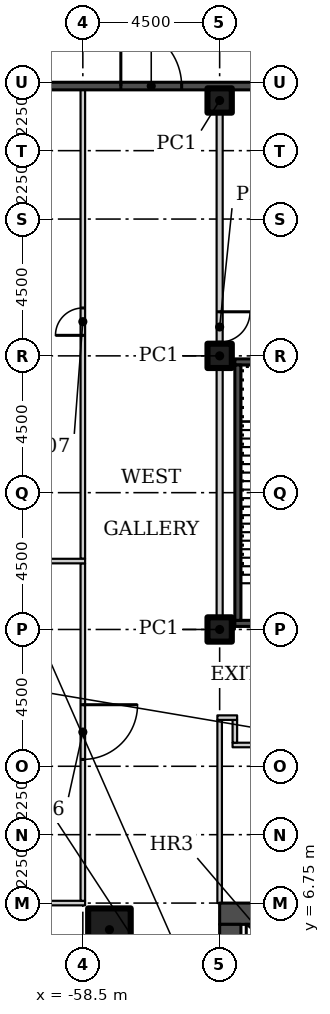
"""IFC4 building model, lengths in metres.
Left out: names, types, materials, properties, quantities, classifications, styles, units other than length and angle.
Written with IfcOpenShell. Run it as: python <this file> out.ifc"""

import sys

from ifc_helpers import new_model, si_unit, direction, frame, frame_2d, origin, origin_2d, place, context, subcontext, project, spatial, rectangle, hollow_rectangle, extrude, element, fill, save


model = new_model("IFC4")
c1 = context("Model", 3, precision=1e-05, world=origin(), true_north=direction((0.0, 1.0)))
c2 = subcontext(c1, "Body", "Model", "MODEL_VIEW")
j1 = project(units=[si_unit("LENGTHUNIT", "METRE"), si_unit("PLANEANGLEUNIT", "RADIAN")], contexts=[c1])
p1 = place(None, origin())
s1 = spatial("IfcSite", under=j1, at=p1, CompositionType="ELEMENT")
p2 = place(p1, origin())
s2 = spatial("IfcBuilding", under=s1, at=p2, CompositionType="ELEMENT")
p3 = place(p2, origin())
s3 = spatial("IfcBuildingStorey", under=s2, at=p3, CompositionType="ELEMENT", Elevation=0.0)
p4 = place(p3, frame((-57.625, 5.875, 0.0)))
e1 = element("IfcColumn", 1, at=p4, inside=s3, PredefinedType="COLUMN", context=c2, shape_type="SweptSolid", body=[
    extrude(hollow_rectangle(XDim=1.4, YDim=1.4, WallThickness=0.06, at=origin_2d()), origin(), (0.0, 0.0, 1.0), 6.1),
])
for number, where in (
    (2, (-54.0, 15.75, 0.0)),
    (3, (-54.0, 24.75, 0.0)),
    (4, (-54.0, 33.15, 0.0)),
):
    element("IfcColumn", number, at=place(p3, frame(where)), inside=s3, PredefinedType="COLUMN", context=c2, shape_type="SweptSolid", body=[
        extrude(hollow_rectangle(XDim=0.8, YDim=0.8, WallThickness=0.03, at=origin_2d()), origin(), (0.0, 0.0, 1.0), 6.1),
    ])
p5 = place(p3, frame((-53.575, 11.95, 0.0)))
e5 = element("IfcWall", 5, at=p5, inside=s3, PredefinedType="PARTITIONING", context=c2, shape_type="SweptSolid", body=[
    extrude(rectangle(XDim=9.175, YDim=0.15, at=frame_2d((4.587, 0.0))), origin(), (0.0, 0.0, 1.0), 6.1),
])
p6 = place(p5, frame((3.175, 0.0, 0.0)))
e6 = element("IfcOpeningElement", 6, at=p6, cuts=e5, PredefinedType="OPENING", context=c2, shape_type="SweptSolid", body=[
    extrude(rectangle(XDim=1.8, YDim=2.4, at=frame_2d((0.9, 1.2))), frame((0.0, 0.085, 0.0), z_axis=(0.0, -1.0, 0.0), x_axis=(1.0, 0.0, 0.0)), (0.0, 0.0, 1.0), 0.17),
])
p7 = place(p3, frame((-58.425, 6.75, 0.0), z_axis=(0.0, 0.0, 1.0), x_axis=(-1.0, 0.0, 0.0)))
e7 = element("IfcWall", 7, at=p7, inside=s3, PredefinedType="PARTITIONING", context=c2, shape_type="SweptSolid", body=[
    extrude(rectangle(XDim=8.98, YDim=0.15, at=frame_2d((4.49, 0.0))), origin(), (0.0, 0.0, 1.0), 6.1),
])
p8 = place(p7, frame((4.425, 0.0, 0.0)))
e8 = element("IfcOpeningElement", 8, at=p8, cuts=e7, PredefinedType="OPENING", context=c2, shape_type="SweptSolid", body=[
    extrude(rectangle(XDim=1.8, YDim=2.4, at=frame_2d((0.9, 1.2))), frame((0.0, 0.085, 0.0), z_axis=(0.0, -1.0, 0.0), x_axis=(1.0, 0.0, 0.0)), (0.0, 0.0, 1.0), 0.17),
])
p9 = place(p3, frame((-54.0, 6.75, 0.0), z_axis=(0.0, 0.0, 1.0), x_axis=(0.0, 1.0, 0.0)))
e9 = element("IfcWall", 9, at=p9, inside=s3, PredefinedType="PARTITIONING", context=c2, shape_type="SweptSolid", body=[
    extrude(rectangle(XDim=6.025, YDim=0.15, at=frame_2d((3.012, 0.0))), origin(), (0.0, 0.0, 1.0), 6.1),
])
p10 = place(p3, frame((-54.0, 33.655, 0.0), z_axis=(0.0, 0.0, 1.0), x_axis=(0.0, -1.0, 0.0)))
e10 = element("IfcWall", 10, at=p10, inside=s3, PredefinedType="PARTITIONING", context=c2, shape_type="SweptSolid", body=[
    extrude(rectangle(XDim=17.705, YDim=0.2, at=frame_2d((8.853, 0.0))), origin(), (0.0, 0.0, 1.0), 6.1),
])
p11 = place(p10, frame((7.455, 0.0, 0.0)))
e11 = element("IfcOpeningElement", 11, at=p11, cuts=e10, PredefinedType="OPENING", context=c2, shape_type="SweptSolid", body=[
    extrude(rectangle(XDim=1.0, YDim=2.1, at=frame_2d((0.5, 1.05))), frame((0.0, 0.11, 0.0), z_axis=(0.0, -1.0, 0.0), x_axis=(1.0, 0.0, 0.0)), (0.0, 0.0, 1.0), 0.22),
])
p12 = place(p3, frame((-58.5, 17.925, 0.0), z_axis=(0.0, 0.0, 1.0), x_axis=(0.0, -1.0, 0.0)))
e12 = element("IfcWall", 12, at=p12, inside=s3, PredefinedType="PARTITIONING", context=c2, shape_type="SweptSolid", body=[
    extrude(rectangle(XDim=11.1, YDim=0.15, at=frame_2d((5.55, 0.0))), origin(), (0.0, 0.0, 1.0), 6.1),
])
p13 = place(p12, frame((4.65, 0.0, 0.0)))
e13 = element("IfcOpeningElement", 13, at=p13, cuts=e12, PredefinedType="OPENING", context=c2, shape_type="SweptSolid", body=[
    extrude(rectangle(XDim=1.8, YDim=2.4, at=frame_2d((0.9, 1.2))), frame((0.0, 0.085, 0.0), z_axis=(0.0, -1.0, 0.0), x_axis=(1.0, 0.0, 0.0)), (0.0, 0.0, 1.0), 0.17),
])
p14 = place(p3, frame((-58.5, 18.075, 0.0), z_axis=(0.0, 0.0, 1.0), x_axis=(0.0, 1.0, 0.0)))
e14 = element("IfcWall", 14, at=p14, inside=s3, PredefinedType="PARTITIONING", context=c2, shape_type="SweptSolid", body=[
    extrude(rectangle(XDim=15.58, YDim=0.15, at=frame_2d((7.79, 0.0))), origin(), (0.0, 0.0, 1.0), 6.1),
])
p15 = place(p14, frame((7.35, 0.0, 0.0)))
e15 = element("IfcOpeningElement", 15, at=p15, cuts=e14, PredefinedType="OPENING", context=c2, shape_type="SweptSolid", body=[
    extrude(rectangle(XDim=0.9, YDim=2.1, at=frame_2d((0.45, 1.05))), frame((0.0, 0.085, 0.0), z_axis=(0.0, -1.0, 0.0), x_axis=(1.0, 0.0, 0.0)), (0.0, 0.0, 1.0), 0.17),
])
p16 = place(p3, frame((-53.5, 12.775, 0.0), z_axis=(0.0, 0.0, 1.0), x_axis=(0.0, -1.0, 0.0)))
e16 = element("IfcWall", 16, at=p16, inside=s3, PredefinedType="PARTITIONING", context=c2, shape_type="SweptSolid", body=[
    extrude(rectangle(XDim=0.75, YDim=0.15, at=frame_2d((0.375, 0.0))), origin(), (0.0, 0.0, 1.0), 6.1),
])
p17 = place(p3, frame((-54.075, 12.85, 0.0)))
e17 = element("IfcWall", 17, at=p17, inside=s3, PredefinedType="PARTITIONING", context=c2, shape_type="SweptSolid", body=[
    extrude(rectangle(XDim=0.65, YDim=0.15, at=frame_2d((0.325, 0.0))), origin(), (0.0, 0.0, 1.0), 6.1),
])
p18 = place(p3, frame((-54.1, 15.85, 0.0)))
e18 = element("IfcWall", 18, at=p18, inside=s3, PredefinedType="PARTITIONING", context=c2, shape_type="SweptSolid", body=[
    extrude(rectangle(XDim=0.6, YDim=0.2, at=frame_2d((0.3, 0.0))), origin(), (0.0, 0.0, 1.0), 6.1),
])
p19 = place(p3, frame((-58.425, 18.0, 0.0), z_axis=(0.0, 0.0, 1.0), x_axis=(-1.0, 0.0, 0.0)))
e19 = element("IfcWall", 19, at=p19, inside=s3, PredefinedType="PARTITIONING", context=c2, shape_type="SweptSolid", body=[
    extrude(rectangle(XDim=8.98, YDim=0.15, at=frame_2d((4.49, 0.0))), origin(), (0.0, 0.0, 1.0), 6.1),
])
p20 = place(p3, frame((-67.5, 33.625, 0.0)))
e20 = element("IfcWall", 20, at=p20, inside=s3, PredefinedType="SOLIDWALL", context=c2, shape_type="SweptSolid", body=[
    extrude(rectangle(XDim=130.5, YDim=0.25, at=frame_2d((65.25, 0.0))), origin(), (0.0, 0.0, 1.0), 6.15),
])
p21 = place(p20, frame((28.65, 0.0, 0.0)))
e21 = element("IfcOpeningElement", 21, at=p21, cuts=e20, PredefinedType="OPENING", context=c2, shape_type="SweptSolid", body=[
    extrude(rectangle(XDim=1.2, YDim=2.4, at=frame_2d((0.6, 1.2))), frame((0.0, 0.135, 0.0), z_axis=(0.0, -1.0, 0.0), x_axis=(1.0, 0.0, 0.0)), (0.0, 0.0, 1.0), 0.27),
])
p22 = place(p20, frame((37.25, 0.0, 0.0)))
e22 = element("IfcOpeningElement", 22, at=p22, cuts=e20, PredefinedType="OPENING", context=c2, shape_type="SweptSolid", body=[
    extrude(rectangle(XDim=2.0, YDim=2.4, at=frame_2d((1.0, 1.2))), frame((0.0, 0.135, 0.0), z_axis=(0.0, -1.0, 0.0), x_axis=(1.0, 0.0, 0.0)), (0.0, 0.0, 1.0), 0.27),
])
p23 = place(p20, frame((100.25, 0.0, 0.0)))
e23 = element("IfcOpeningElement", 23, at=p23, cuts=e20, PredefinedType="OPENING", context=c2, shape_type="SweptSolid", body=[
    extrude(rectangle(XDim=2.0, YDim=2.4, at=frame_2d((1.0, 1.2))), frame((0.0, 0.135, 0.0), z_axis=(0.0, -1.0, 0.0), x_axis=(1.0, 0.0, 0.0)), (0.0, 0.0, 1.0), 0.27),
])
p24 = place(p20, frame((55.25, 0.0, 0.0)))
e24 = element("IfcOpeningElement", 24, at=p24, cuts=e20, PredefinedType="OPENING", context=c2, shape_type="SweptSolid", body=[
    extrude(rectangle(XDim=2.0, YDim=2.4, at=frame_2d((1.0, 1.2))), frame((0.0, 0.135, 0.0), z_axis=(0.0, -1.0, 0.0), x_axis=(1.0, 0.0, 0.0)), (0.0, 0.0, 1.0), 0.27),
])
p25 = place(p20, frame((68.75, 0.0, 0.0)))
e25 = element("IfcOpeningElement", 25, at=p25, cuts=e20, PredefinedType="OPENING", context=c2, shape_type="SweptSolid", body=[
    extrude(rectangle(XDim=2.0, YDim=2.4, at=frame_2d((1.0, 1.2))), frame((0.0, 0.135, 0.0), z_axis=(0.0, -1.0, 0.0), x_axis=(1.0, 0.0, 0.0)), (0.0, 0.0, 1.0), 0.27),
])
p26 = place(p20, frame((10.25, 0.0, 0.0)))
e26 = element("IfcOpeningElement", 26, at=p26, cuts=e20, PredefinedType="OPENING", context=c2, shape_type="SweptSolid", body=[
    extrude(rectangle(XDim=2.0, YDim=2.4, at=frame_2d((1.0, 1.2))), frame((0.0, 0.135, 0.0), z_axis=(0.0, -1.0, 0.0), x_axis=(1.0, 0.0, 0.0)), (0.0, 0.0, 1.0), 0.27),
])
p27 = place(p20, frame((5.65, 0.0, 0.0)))
e27 = element("IfcOpeningElement", 27, at=p27, cuts=e20, PredefinedType="OPENING", context=c2, shape_type="SweptSolid", body=[
    extrude(rectangle(XDim=2.2, YDim=2.4, at=frame_2d((1.1, 1.2))), frame((0.0, 0.135, 0.0), z_axis=(0.0, -1.0, 0.0), x_axis=(1.0, 0.0, 0.0)), (0.0, 0.0, 1.0), 0.27),
])
p28 = place(p20, frame((113.65, 0.0, 0.0)))
e28 = element("IfcOpeningElement", 28, at=p28, cuts=e20, PredefinedType="OPENING", context=c2, shape_type="SweptSolid", body=[
    extrude(rectangle(XDim=2.2, YDim=2.4, at=frame_2d((1.1, 1.2))), frame((0.0, 0.135, 0.0), z_axis=(0.0, -1.0, 0.0), x_axis=(1.0, 0.0, 0.0)), (0.0, 0.0, 1.0), 0.27),
])
p29 = place(p20, frame((45.45, 0.0, 0.0)))
e29 = element("IfcOpeningElement", 29, at=p29, cuts=e20, PredefinedType="OPENING", context=c2, shape_type="SweptSolid", body=[
    extrude(rectangle(XDim=3.6, YDim=4.5, at=frame_2d((1.8, 2.25))), frame((0.0, 0.135, 0.0), z_axis=(0.0, -1.0, 0.0), x_axis=(1.0, 0.0, 0.0)), (0.0, 0.0, 1.0), 0.27),
])
p30 = place(p20, frame((91.15, 0.0, 0.0)))
e30 = element("IfcOpeningElement", 30, at=p30, cuts=e20, PredefinedType="OPENING", context=c2, shape_type="SweptSolid", body=[
    extrude(rectangle(XDim=2.2, YDim=2.4, at=frame_2d((1.1, 1.2))), frame((0.0, 0.135, 0.0), z_axis=(0.0, -1.0, 0.0), x_axis=(1.0, 0.0, 0.0)), (0.0, 0.0, 1.0), 0.27),
])
p31 = place(p20, frame((23.0, 0.0, 0.0)))
e31 = element("IfcOpeningElement", 31, at=p31, cuts=e20, PredefinedType="OPENING", context=c2, shape_type="SweptSolid", body=[
    extrude(rectangle(XDim=3.3, YDim=2.4, at=frame_2d((1.65, 1.2))), frame((0.0, 0.135, 0.0), z_axis=(0.0, -1.0, 0.0), x_axis=(1.0, 0.0, 0.0)), (0.0, 0.0, 1.0), 0.27),
])
p32 = place(p20, frame((59.0, 0.0, 0.0)))
e32 = element("IfcOpeningElement", 32, at=p32, cuts=e20, PredefinedType="OPENING", context=c2, shape_type="SweptSolid", body=[
    extrude(rectangle(XDim=3.3, YDim=2.4, at=frame_2d((1.65, 1.2))), frame((0.0, 0.135, 0.0), z_axis=(0.0, -1.0, 0.0), x_axis=(1.0, 0.0, 0.0)), (0.0, 0.0, 1.0), 0.27),
])
p33 = place(p20, frame((86.0, 0.0, 0.0)))
e33 = element("IfcOpeningElement", 33, at=p33, cuts=e20, PredefinedType="OPENING", context=c2, shape_type="SweptSolid", body=[
    extrude(rectangle(XDim=3.3, YDim=2.4, at=frame_2d((1.65, 1.2))), frame((0.0, 0.135, 0.0), z_axis=(0.0, -1.0, 0.0), x_axis=(1.0, 0.0, 0.0)), (0.0, 0.0, 1.0), 0.27),
])
p34 = place(p20, frame((122.0, 0.0, 0.0)))
e34 = element("IfcOpeningElement", 34, at=p34, cuts=e20, PredefinedType="OPENING", context=c2, shape_type="SweptSolid", body=[
    extrude(rectangle(XDim=3.3, YDim=2.4, at=frame_2d((1.65, 1.2))), frame((0.0, 0.135, 0.0), z_axis=(0.0, -1.0, 0.0), x_axis=(1.0, 0.0, 0.0)), (0.0, 0.0, 1.0), 0.27),
])
p35 = place(p20, frame((127.05, 0.0, 3.0)))
e35 = element("IfcOpeningElement", 35, at=p35, cuts=e20, PredefinedType="OPENING", context=c2, shape_type="SweptSolid", body=[
    extrude(rectangle(XDim=2.4, YDim=1.2, at=frame_2d((1.2, 0.6))), frame((0.0, 0.135, 0.0), z_axis=(0.0, -1.0, 0.0), x_axis=(1.0, 0.0, 0.0)), (0.0, 0.0, 1.0), 0.27),
])
p36 = place(p20, frame((118.05, 0.0, 3.0)))
e36 = element("IfcOpeningElement", 36, at=p36, cuts=e20, PredefinedType="OPENING", context=c2, shape_type="SweptSolid", body=[
    extrude(rectangle(XDim=2.4, YDim=1.2, at=frame_2d((1.2, 0.6))), frame((0.0, 0.135, 0.0), z_axis=(0.0, -1.0, 0.0), x_axis=(1.0, 0.0, 0.0)), (0.0, 0.0, 1.0), 0.27),
])
p37 = place(p20, frame((109.05, 0.0, 3.0)))
e37 = element("IfcOpeningElement", 37, at=p37, cuts=e20, PredefinedType="OPENING", context=c2, shape_type="SweptSolid", body=[
    extrude(rectangle(XDim=2.4, YDim=1.2, at=frame_2d((1.2, 0.6))), frame((0.0, 0.135, 0.0), z_axis=(0.0, -1.0, 0.0), x_axis=(1.0, 0.0, 0.0)), (0.0, 0.0, 1.0), 0.27),
])
p38 = place(p20, frame((104.55, 0.0, 3.0)))
e38 = element("IfcOpeningElement", 38, at=p38, cuts=e20, PredefinedType="OPENING", context=c2, shape_type="SweptSolid", body=[
    extrude(rectangle(XDim=2.4, YDim=1.2, at=frame_2d((1.2, 0.6))), frame((0.0, 0.135, 0.0), z_axis=(0.0, -1.0, 0.0), x_axis=(1.0, 0.0, 0.0)), (0.0, 0.0, 1.0), 0.27),
])
p39 = place(p20, frame((95.55, 0.0, 3.0)))
e39 = element("IfcOpeningElement", 39, at=p39, cuts=e20, PredefinedType="OPENING", context=c2, shape_type="SweptSolid", body=[
    extrude(rectangle(XDim=2.4, YDim=1.2, at=frame_2d((1.2, 0.6))), frame((0.0, 0.135, 0.0), z_axis=(0.0, -1.0, 0.0), x_axis=(1.0, 0.0, 0.0)), (0.0, 0.0, 1.0), 0.27),
])
p40 = place(p20, frame((82.05, 0.0, 3.0)))
e40 = element("IfcOpeningElement", 40, at=p40, cuts=e20, PredefinedType="OPENING", context=c2, shape_type="SweptSolid", body=[
    extrude(rectangle(XDim=2.4, YDim=1.2, at=frame_2d((1.2, 0.6))), frame((0.0, 0.135, 0.0), z_axis=(0.0, -1.0, 0.0), x_axis=(1.0, 0.0, 0.0)), (0.0, 0.0, 1.0), 0.27),
])
p41 = place(p20, frame((77.55, 0.0, 3.0)))
e41 = element("IfcOpeningElement", 41, at=p41, cuts=e20, PredefinedType="OPENING", context=c2, shape_type="SweptSolid", body=[
    extrude(rectangle(XDim=2.4, YDim=1.2, at=frame_2d((1.2, 0.6))), frame((0.0, 0.135, 0.0), z_axis=(0.0, -1.0, 0.0), x_axis=(1.0, 0.0, 0.0)), (0.0, 0.0, 1.0), 0.27),
])
p42 = place(p20, frame((73.05, 0.0, 3.0)))
e42 = element("IfcOpeningElement", 42, at=p42, cuts=e20, PredefinedType="OPENING", context=c2, shape_type="SweptSolid", body=[
    extrude(rectangle(XDim=2.4, YDim=1.2, at=frame_2d((1.2, 0.6))), frame((0.0, 0.135, 0.0), z_axis=(0.0, -1.0, 0.0), x_axis=(1.0, 0.0, 0.0)), (0.0, 0.0, 1.0), 0.27),
])
p43 = place(p20, frame((64.05, 0.0, 3.0)))
e43 = element("IfcOpeningElement", 43, at=p43, cuts=e20, PredefinedType="OPENING", context=c2, shape_type="SweptSolid", body=[
    extrude(rectangle(XDim=2.4, YDim=1.2, at=frame_2d((1.2, 0.6))), frame((0.0, 0.135, 0.0), z_axis=(0.0, -1.0, 0.0), x_axis=(1.0, 0.0, 0.0)), (0.0, 0.0, 1.0), 0.27),
])
p44 = place(p20, frame((50.55, 0.0, 3.0)))
e44 = element("IfcOpeningElement", 44, at=p44, cuts=e20, PredefinedType="OPENING", context=c2, shape_type="SweptSolid", body=[
    extrude(rectangle(XDim=2.4, YDim=1.2, at=frame_2d((1.2, 0.6))), frame((0.0, 0.135, 0.0), z_axis=(0.0, -1.0, 0.0), x_axis=(1.0, 0.0, 0.0)), (0.0, 0.0, 1.0), 0.27),
])
p45 = place(p20, frame((41.55, 0.0, 3.0)))
e45 = element("IfcOpeningElement", 45, at=p45, cuts=e20, PredefinedType="OPENING", context=c2, shape_type="SweptSolid", body=[
    extrude(rectangle(XDim=2.4, YDim=1.2, at=frame_2d((1.2, 0.6))), frame((0.0, 0.135, 0.0), z_axis=(0.0, -1.0, 0.0), x_axis=(1.0, 0.0, 0.0)), (0.0, 0.0, 1.0), 0.27),
])
p46 = place(p20, frame((32.55, 0.0, 3.0)))
e46 = element("IfcOpeningElement", 46, at=p46, cuts=e20, PredefinedType="OPENING", context=c2, shape_type="SweptSolid", body=[
    extrude(rectangle(XDim=2.4, YDim=1.2, at=frame_2d((1.2, 0.6))), frame((0.0, 0.135, 0.0), z_axis=(0.0, -1.0, 0.0), x_axis=(1.0, 0.0, 0.0)), (0.0, 0.0, 1.0), 0.27),
])
p47 = place(p20, frame((19.05, 0.0, 3.0)))
e47 = element("IfcOpeningElement", 47, at=p47, cuts=e20, PredefinedType="OPENING", context=c2, shape_type="SweptSolid", body=[
    extrude(rectangle(XDim=2.4, YDim=1.2, at=frame_2d((1.2, 0.6))), frame((0.0, 0.135, 0.0), z_axis=(0.0, -1.0, 0.0), x_axis=(1.0, 0.0, 0.0)), (0.0, 0.0, 1.0), 0.27),
])
p48 = place(p20, frame((14.55, 0.0, 3.0)))
e48 = element("IfcOpeningElement", 48, at=p48, cuts=e20, PredefinedType="OPENING", context=c2, shape_type="SweptSolid", body=[
    extrude(rectangle(XDim=2.4, YDim=1.2, at=frame_2d((1.2, 0.6))), frame((0.0, 0.135, 0.0), z_axis=(0.0, -1.0, 0.0), x_axis=(1.0, 0.0, 0.0)), (0.0, 0.0, 1.0), 0.27),
])
p49 = place(p20, frame((1.05, 0.0, 3.0)))
e49 = element("IfcOpeningElement", 49, at=p49, cuts=e20, PredefinedType="OPENING", context=c2, shape_type="SweptSolid", body=[
    extrude(rectangle(XDim=2.4, YDim=1.2, at=frame_2d((1.2, 0.6))), frame((0.0, 0.135, 0.0), z_axis=(0.0, -1.0, 0.0), x_axis=(1.0, 0.0, 0.0)), (0.0, 0.0, 1.0), 0.27),
])
p50 = place(p3, frame((-40.5, 6.4, 0.0), z_axis=(0.0, 0.0, 1.0), x_axis=(-1.0, 0.0, 0.0)))
e50 = element("IfcWall", 50, at=p50, inside=s3, PredefinedType="SHEAR", context=c2, shape_type="SweptSolid", body=[
    extrude(rectangle(XDim=13.5, YDim=0.7, at=frame_2d((6.75, 0.0))), origin(), (0.0, 0.0, 1.0), 6.1),
])
p51 = place(p3, frame((-53.65, -6.05, 0.0), z_axis=(0.0, 0.0, 1.0), x_axis=(0.0, 1.0, 0.0)))
e51 = element("IfcWall", 51, at=p51, inside=s3, PredefinedType="SHEAR", context=c2, shape_type="SweptSolid", body=[
    extrude(rectangle(XDim=12.1, YDim=0.7, at=frame_2d((6.05, 0.0))), origin(), (0.0, 0.0, 1.0), 6.1),
])
p52 = place(p51, frame((0.8, 0.0, 0.0)))
e52 = element("IfcOpeningElement", 52, at=p52, cuts=e51, PredefinedType="OPENING", context=c2, shape_type="SweptSolid", body=[
    extrude(rectangle(XDim=1.2, YDim=2.1, at=frame_2d((0.6, 1.05))), frame((0.0, 0.36, 0.0), z_axis=(0.0, -1.0, 0.0), x_axis=(1.0, 0.0, 0.0)), (0.0, 0.0, 1.0), 0.72),
])
p53 = place(p51, frame((6.4, 0.0, 0.0)))
e53 = element("IfcOpeningElement", 53, at=p53, cuts=e51, PredefinedType="OPENING", context=c2, shape_type="SweptSolid", body=[
    extrude(rectangle(XDim=1.8, YDim=2.4, at=frame_2d((0.9, 1.2))), frame((0.0, 0.36, 0.0), z_axis=(0.0, -1.0, 0.0), x_axis=(1.0, 0.0, 0.0)), (0.0, 0.0, 1.0), 0.72),
])
p54 = place(p3, frame((-53.5, 15.95, 0.0)))
e54 = element("IfcWall", 54, at=p54, inside=s3, PredefinedType="SHEAR", context=c2, shape_type="SweptSolid", body=[
    extrude(rectangle(XDim=8.0, YDim=0.2, at=frame_2d((4.0, 0.0))), origin(), (0.0, 0.0, 1.0), 6.1),
])
p55 = place(p54, frame((1.462, 0.0, 0.0)))
e55 = element("IfcOpeningElement", 55, at=p55, cuts=e54, PredefinedType="OPENING", context=c2, shape_type="SweptSolid", body=[
    extrude(rectangle(XDim=1.2, YDim=2.4, at=frame_2d((0.6, 1.2))), frame((0.0, 0.11, 0.0), z_axis=(0.0, -1.0, 0.0), x_axis=(1.0, 0.0, 0.0)), (0.0, 0.0, 1.0), 0.22),
])
p56 = place(p54, frame((5.337, 0.0, 0.0)))
e56 = element("IfcOpeningElement", 56, at=p56, cuts=e54, PredefinedType="OPENING", context=c2, shape_type="SweptSolid", body=[
    extrude(rectangle(XDim=1.2, YDim=2.4, at=frame_2d((0.6, 1.2))), frame((0.0, 0.11, 0.0), z_axis=(0.0, -1.0, 0.0), x_axis=(1.0, 0.0, 0.0)), (0.0, 0.0, 1.0), 0.22),
])
p57 = place(p3, frame((-53.5, 24.55, 0.0)))
e57 = element("IfcWall", 57, at=p57, inside=s3, PredefinedType="SHEAR", context=c2, shape_type="SweptSolid", body=[
    extrude(rectangle(XDim=8.0, YDim=0.2, at=frame_2d((4.0, 0.0))), origin(), (0.0, 0.0, 1.0), 6.1),
])
p58 = place(p3, frame((-53.4, 16.05, 0.0), z_axis=(0.0, 0.0, 1.0), x_axis=(0.0, 1.0, 0.0)))
e58 = element("IfcWall", 58, at=p58, inside=s3, PredefinedType="SHEAR", context=c2, shape_type="SweptSolid", body=[
    extrude(rectangle(XDim=8.4, YDim=0.2, at=frame_2d((4.2, 0.0))), origin(), (0.0, 0.0, 1.0), 6.1),
])
p59 = place(p13, origin())
e59 = element("IfcDoor", 59, at=p59, inside=s3, OperationType="DOUBLE_DOOR_SINGLE_SWING", PredefinedType="DOOR", context=c2, shape_type="SweptSolid", body=[
    extrude(rectangle(XDim=1.8, YDim=2.4, at=frame_2d((0.9, 1.2))), frame((0.0, 0.025, 0.0), z_axis=(0.0, -1.0, 0.0), x_axis=(1.0, 0.0, 0.0)), (0.0, 0.0, 1.0), 0.05),
])
fill(e13, e59)
p60 = place(p15, origin())
e60 = element("IfcDoor", 60, at=p60, inside=s3, OperationType="SINGLE_SWING_RIGHT", PredefinedType="DOOR", context=c2, shape_type="SweptSolid", body=[
    extrude(rectangle(XDim=0.9, YDim=2.1, at=frame_2d((0.45, 1.05))), frame((0.0, 0.025, 0.0), z_axis=(0.0, -1.0, 0.0), x_axis=(1.0, 0.0, 0.0)), (0.0, 0.0, 1.0), 0.05),
])
fill(e15, e60)
p61 = place(p11, origin())
e61 = element("IfcDoor", 61, at=p61, inside=s3, OperationType="SINGLE_SWING_LEFT", PredefinedType="DOOR", context=c2, shape_type="SweptSolid", body=[
    extrude(rectangle(XDim=1.0, YDim=2.1, at=frame_2d((0.5, 1.05))), frame((0.0, 0.025, 0.0), z_axis=(0.0, -1.0, 0.0), x_axis=(1.0, 0.0, 0.0)), (0.0, 0.0, 1.0), 0.05),
])
fill(e11, e61)
p62 = place(p26, origin())
e62 = element("IfcDoor", 62, at=p62, inside=s3, OperationType="DOUBLE_DOOR_SINGLE_SWING", PredefinedType="DOOR", context=c2, shape_type="SweptSolid", body=[
    extrude(rectangle(XDim=2.0, YDim=2.4, at=frame_2d((1.0, 1.2))), frame((0.0, 0.025, 0.0), z_axis=(0.0, -1.0, 0.0), x_axis=(1.0, 0.0, 0.0)), (0.0, 0.0, 1.0), 0.05),
])
fill(e26, e62)
save(model, sys.argv[1])
